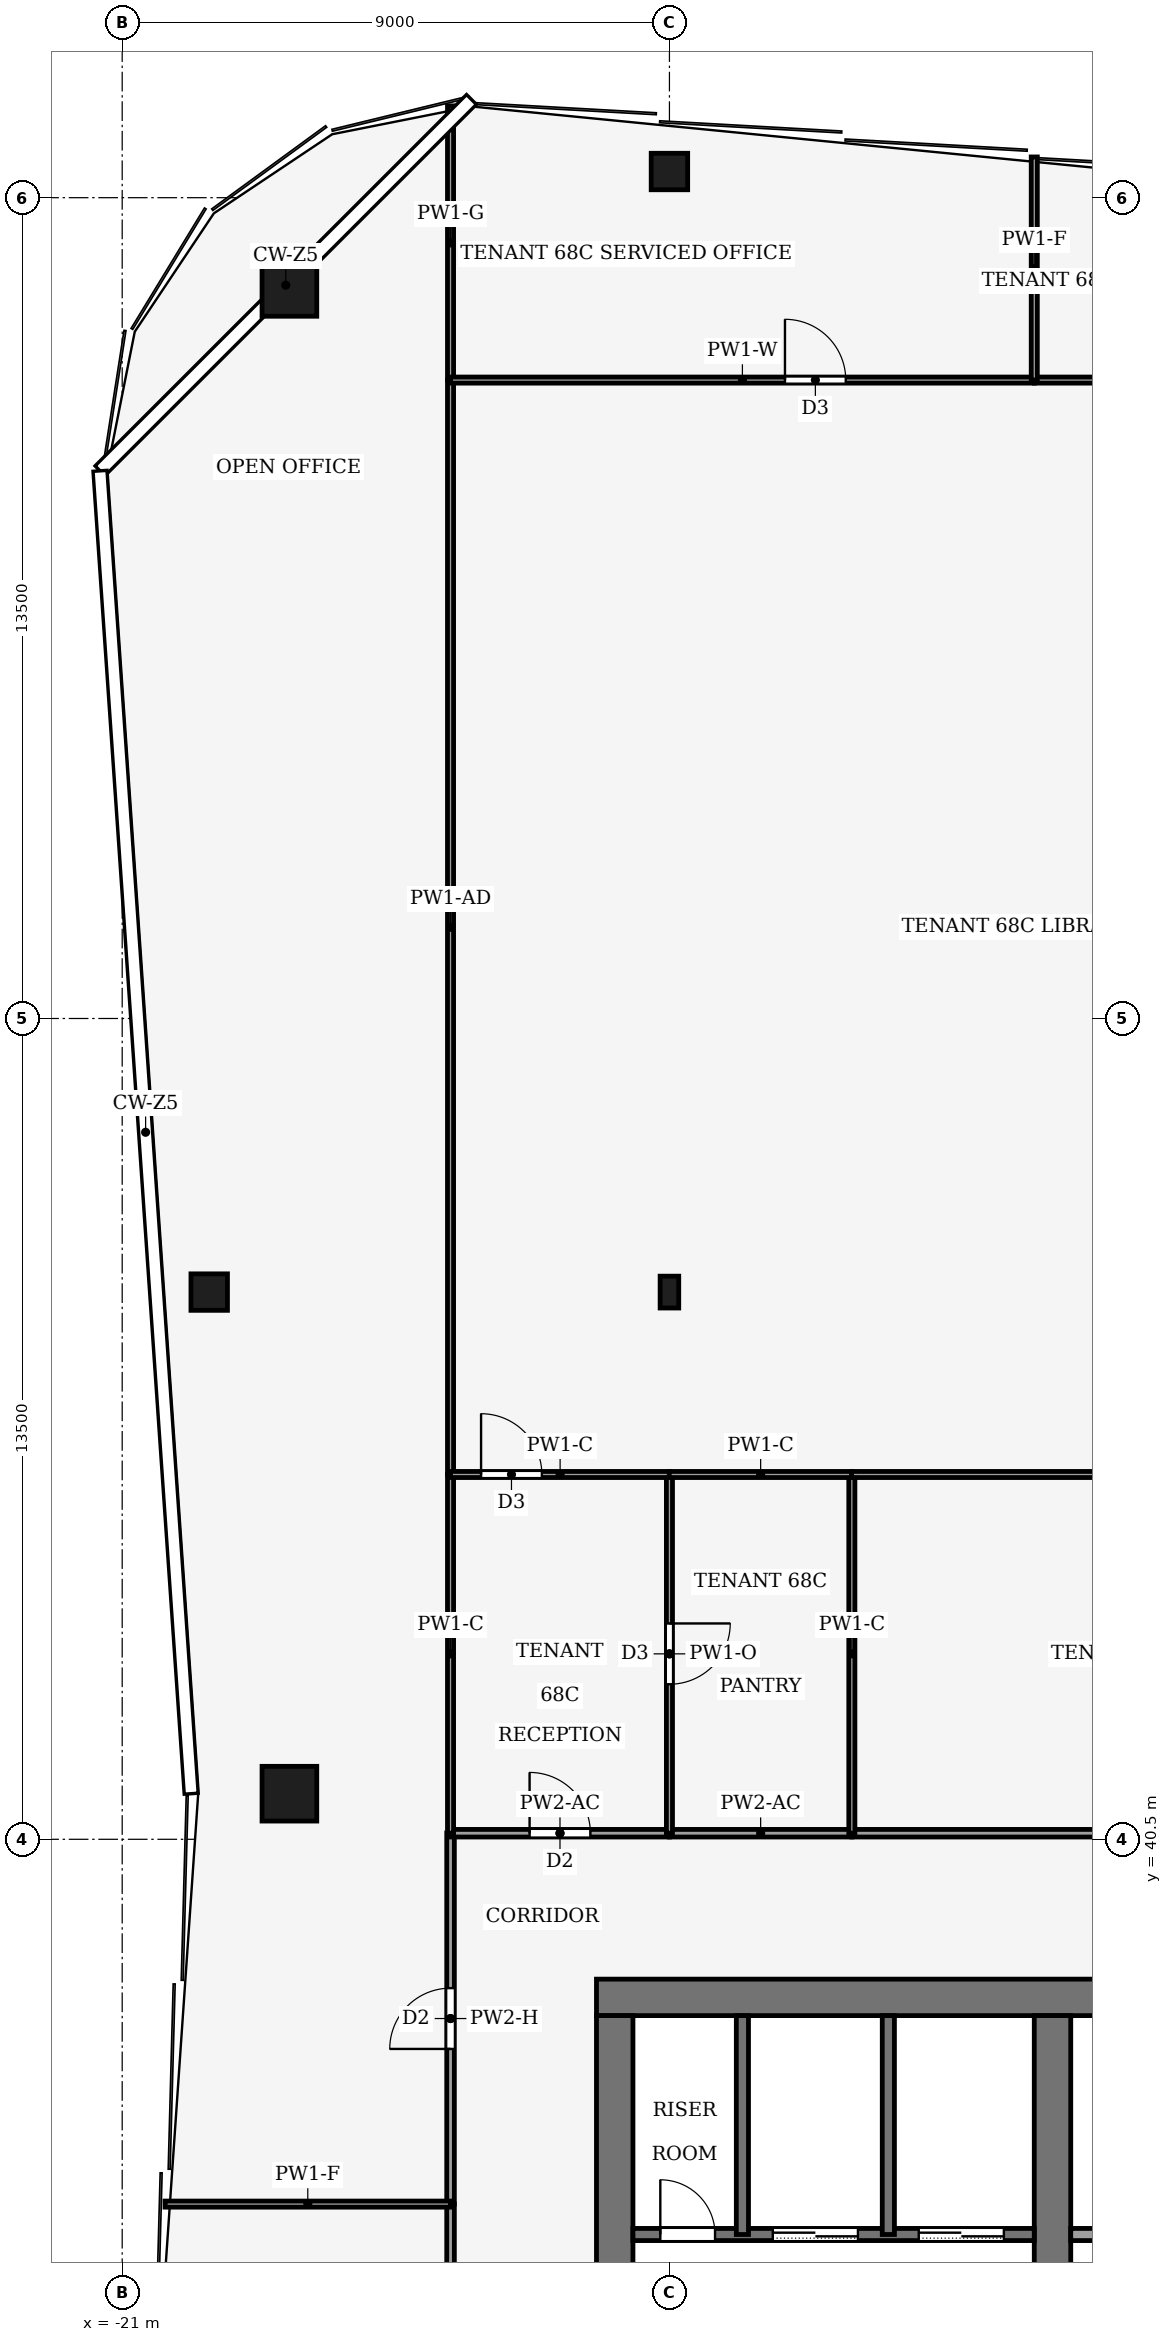
"""IFC4 building model, lengths in metres.
Left out: names, types, materials, properties, quantities, classifications, styles, units other than length and angle.
Written with IfcOpenShell. Run it as: python <this file> out.ifc"""

import sys

from ifc_helpers import new_model, si_unit, direction, frame, frame_2d, origin, origin_2d, place, context, subcontext, project, spatial, rectangle, hollow_rectangle, i_section, extrude, element, fill, save


model = new_model("IFC4")
c1 = context("Model", 3, precision=1e-05, world=origin(), true_north=direction((0.0, 1.0)))
c2 = subcontext(c1, "Body", "Model", "MODEL_VIEW")
j1 = project(units=[si_unit("LENGTHUNIT", "METRE"), si_unit("PLANEANGLEUNIT", "RADIAN")], contexts=[c1])
p1 = place(None, origin())
s1 = spatial("IfcSite", under=j1, at=p1, CompositionType="ELEMENT")
p2 = place(p1, origin())
s2 = spatial("IfcBuilding", under=s1, at=p2, CompositionType="ELEMENT")
p3 = place(p2, frame((0.0, 0.0, 298.0)))
s3 = spatial("IfcBuildingStorey", under=s2, at=p3, CompositionType="ELEMENT", Elevation=298.0)
p4 = place(p3, frame((-13.2, 37.9, -0.13), z_axis=(0.0, 0.0, 1.0), x_axis=(1.0, 0.0, 0.0)))
e1 = element("IfcWall", 1, at=p4, inside=s3, PredefinedType="SHEAR", context=c2, shape_type="SweptSolid", body=[
    extrude(rectangle(XDim=26.4, YDim=0.6, at=frame_2d((13.2, 0.0))), origin(), (0.0, 0.0, 1.0), 4.0),
])
p5 = place(p3, frame((-12.9, 18.4, -0.13), z_axis=(0.0, 0.0, 1.0), x_axis=(0.0, 1.0, 0.0)))
e2 = element("IfcWall", 2, at=p5, inside=s3, PredefinedType="SHEAR", context=c2, shape_type="SweptSolid", body=[
    extrude(rectangle(XDim=19.2, YDim=0.6, at=frame_2d((9.6, 0.0))), origin(), (0.0, 0.0, 1.0), 4.0),
])
p6 = place(p5, frame((2.8, 0.0, 0.13)))
e3 = element("IfcOpeningElement", 3, at=p6, cuts=e2, PredefinedType="OPENING", context=c2, shape_type="SweptSolid", body=[
    extrude(rectangle(XDim=2.4, YDim=2.4, at=frame_2d((1.2, 1.2))), frame((0.0, 0.31, 0.0), z_axis=(0.0, -1.0, 0.0), x_axis=(1.0, 0.0, 0.0)), (0.0, 0.0, 1.0), 0.62),
])
p7 = place(p5, frame((13.4, 0.0, 0.13)))
e4 = element("IfcOpeningElement", 4, at=p7, cuts=e2, PredefinedType="OPENING", context=c2, shape_type="SweptSolid", body=[
    extrude(rectangle(XDim=1.4, YDim=2.2, at=frame_2d((0.7, 1.1))), frame((0.0, 0.31, 0.0), z_axis=(0.0, -1.0, 0.0), x_axis=(1.0, 0.0, 0.0)), (0.0, 0.0, 1.0), 0.62),
])
p8 = place(p3, frame((-5.7, 18.4, -0.13), z_axis=(0.0, 0.0, 1.0), x_axis=(0.0, 1.0, 0.0)))
e5 = element("IfcWall", 5, at=p8, inside=s3, PredefinedType="SHEAR", context=c2, shape_type="SweptSolid", body=[
    extrude(rectangle(XDim=19.2, YDim=0.6, at=frame_2d((9.6, 0.0))), origin(), (0.0, 0.0, 1.0), 4.0),
])
p9 = place(p8, frame((8.35, 0.0, 0.13)))
e6 = element("IfcOpeningElement", 6, at=p9, cuts=e5, PredefinedType="OPENING", context=c2, shape_type="SweptSolid", body=[
    extrude(rectangle(XDim=0.9, YDim=2.1, at=frame_2d((0.45, 1.05))), frame((0.0, 0.31, 0.0), z_axis=(0.0, -1.0, 0.0), x_axis=(1.0, 0.0, 0.0)), (0.0, 0.0, 1.0), 0.62),
])
for number, where, z_axis, x_axis in (
    (7, (-18.25, 66.0, 0.0), (0.0, 0.0, 1.0), (1.0, 0.0, 0.0)),
    (8, (-18.25, 41.25, 0.0), (0.0, 0.0, 1.0), (1.0, 0.0, 0.0)),
):
    element("IfcColumn", number, at=place(p3, frame(where, z_axis=z_axis, x_axis=x_axis)), inside=s3, PredefinedType="COLUMN", context=c2, shape_type="SweptSolid", body=[
        extrude(hollow_rectangle(XDim=0.9, YDim=0.9, WallThickness=0.04, at=origin_2d()), origin(), (0.0, 0.0, 1.0), 4.0),
    ])
for number, where, z_axis, x_axis in (
    (9, (-12.0, 67.93, 0.0), (0.0, 0.0, 1.0), (1.0, 0.0, 0.0)),
    (10, (-19.569, 49.5, 0.0), (0.0, 0.0, 1.0), (1.0, 0.0, 0.0)),
):
    element("IfcColumn", number, at=place(p3, frame(where, z_axis=z_axis, x_axis=x_axis)), inside=s3, PredefinedType="COLUMN", context=c2, shape_type="SweptSolid", body=[
        extrude(hollow_rectangle(XDim=0.6, YDim=0.6, WallThickness=0.025, at=origin_2d()), origin(), (0.0, 0.0, 1.0), 4.0),
    ])
p10 = place(p3, frame((-12.0, 49.5, 0.0), z_axis=(0.0, 0.0, 1.0), x_axis=(1.0, 0.0, 0.0)))
e11 = element("IfcColumn", 11, at=p10, inside=s3, PredefinedType="COLUMN", context=c2, shape_type="SweptSolid", body=[
    extrude(i_section(OverallWidth=0.306, OverallDepth=0.524, WebThickness=0.012, FlangeThickness=0.04, FilletRadius=0.027, at=origin_2d()), origin(), (0.0, 0.0, 1.0), 4.0),
])
p11 = place(p3, frame((-12.6, 34.0, 0.0), z_axis=(0.0, 0.0, 1.0), x_axis=(1.0, 0.0, 0.0)))
e12 = element("IfcWall", 12, at=p11, inside=s3, PredefinedType="PARTITIONING", context=c2, shape_type="SweptSolid", body=[
    extrude(rectangle(XDim=6.6, YDim=0.2, at=frame_2d((3.3, 0.0))), origin(), (0.0, 0.0, 1.0), 3.87),
])
p12 = place(p11, frame((4.7, 0.0, 0.0)))
e13 = element("IfcOpeningElement", 13, at=p12, cuts=e12, PredefinedType="OPENING", context=c2, shape_type="SweptSolid", body=[
    extrude(rectangle(XDim=1.4, YDim=2.2, at=frame_2d((0.7, 1.1))), frame((0.0, 0.11, 0.0), z_axis=(0.0, -1.0, 0.0), x_axis=(1.0, 0.0, 0.0)), (0.0, 0.0, 1.0), 0.22),
])
p13 = place(p11, frame((2.3, 0.0, 0.0)))
e14 = element("IfcOpeningElement", 14, at=p13, cuts=e12, PredefinedType="OPENING", context=c2, shape_type="SweptSolid", body=[
    extrude(rectangle(XDim=1.4, YDim=2.2, at=frame_2d((0.7, 1.1))), frame((0.0, 0.11, 0.0), z_axis=(0.0, -1.0, 0.0), x_axis=(1.0, 0.0, 0.0)), (0.0, 0.0, 1.0), 0.22),
])
p14 = place(p11, frame((0.45, 0.0, 0.0)))
e15 = element("IfcOpeningElement", 15, at=p14, cuts=e12, PredefinedType="OPENING", context=c2, shape_type="SweptSolid", body=[
    extrude(rectangle(XDim=0.9, YDim=2.1, at=frame_2d((0.45, 1.05))), frame((0.0, 0.11, 0.0), z_axis=(0.0, -1.0, 0.0), x_axis=(1.0, 0.0, 0.0)), (0.0, 0.0, 1.0), 0.22),
])
p15 = place(p3, frame((-5.4, 34.0, 0.0), z_axis=(0.0, 0.0, 1.0), x_axis=(1.0, 0.0, 0.0)))
e16 = element("IfcWall", 16, at=p15, inside=s3, PredefinedType="PARTITIONING", context=c2, shape_type="SweptSolid", body=[
    extrude(rectangle(XDim=10.8, YDim=0.2, at=frame_2d((5.4, 0.0))), origin(), (0.0, 0.0, 1.0), 3.87),
])
p16 = place(p15, frame((6.15, 0.0, 0.0)))
e17 = element("IfcOpeningElement", 17, at=p16, cuts=e16, PredefinedType="OPENING", context=c2, shape_type="SweptSolid", body=[
    extrude(rectangle(XDim=1.2, YDim=2.2, at=frame_2d((0.6, 1.1))), frame((0.0, 0.11, 0.0), z_axis=(0.0, -1.0, 0.0), x_axis=(1.0, 0.0, 0.0)), (0.0, 0.0, 1.0), 0.22),
])
p17 = place(p15, frame((8.95, 0.0, 0.0)))
e18 = element("IfcOpeningElement", 18, at=p17, cuts=e16, PredefinedType="OPENING", context=c2, shape_type="SweptSolid", body=[
    extrude(rectangle(XDim=1.0, YDim=2.1, at=frame_2d((0.5, 1.05))), frame((0.0, 0.11, 0.0), z_axis=(0.0, -1.0, 0.0), x_axis=(1.0, 0.0, 0.0)), (0.0, 0.0, 1.0), 0.22),
])
for number, where, z_axis, x_axis in (
    (19, (-10.8, 34.0, 0.0), (0.0, 0.0, 1.0), (0.0, 1.0, 0.0)),
    (20, (-8.4, 34.0, 0.0), (0.0, 0.0, 1.0), (0.0, 1.0, 0.0)),
):
    element("IfcWall", number, at=place(p3, frame(where, z_axis=z_axis, x_axis=x_axis)), inside=s3, PredefinedType="PARTITIONING", context=c2, shape_type="SweptSolid", body=[
        extrude(rectangle(XDim=3.6, YDim=0.2, at=frame_2d((1.8, 0.0))), origin(), (0.0, 0.0, 1.0), 3.87),
    ])
p18 = place(p3, frame((-15.6, 22.5, 0.0), z_axis=(0.0, 0.0, 1.0), x_axis=(0.0, 1.0, 0.0)))
e21 = element("IfcWall", 21, at=p18, inside=s3, PredefinedType="PARTITIONING", context=c2, shape_type="SweptSolid", body=[
    extrude(rectangle(XDim=12.0, YDim=0.125, at=frame_2d((6.0, 0.0))), origin(), (0.0, 0.0, 1.0), 3.54),
])
p19 = place(p18, frame((5.5, 0.0, 0.0)))
e22 = element("IfcOpeningElement", 22, at=p19, cuts=e21, PredefinedType="OPENING", context=c2, shape_type="SweptSolid", body=[
    extrude(rectangle(XDim=1.0, YDim=2.1, at=frame_2d((0.5, 1.05))), frame((0.0, 0.073, 0.0), z_axis=(0.0, -1.0, 0.0), x_axis=(1.0, 0.0, 0.0)), (0.0, 0.0, 1.0), 0.145),
])
p20 = place(p3, frame((-15.6, 34.5, 0.0), z_axis=(0.0, 0.0, 1.0), x_axis=(0.0, 1.0, 0.0)))
e23 = element("IfcWall", 23, at=p20, inside=s3, PredefinedType="PARTITIONING", context=c2, shape_type="SweptSolid", body=[
    extrude(rectangle(XDim=6.104, YDim=0.125, at=frame_2d((3.052, 0.0))), origin(), (0.0, 0.0, 1.0), 3.14),
])
p21 = place(p20, frame((2.552, 0.0, 0.0)))
e24 = element("IfcOpeningElement", 24, at=p21, cuts=e23, PredefinedType="OPENING", context=c2, shape_type="SweptSolid", body=[
    extrude(rectangle(XDim=1.0, YDim=2.1, at=frame_2d((0.5, 1.05))), frame((0.0, 0.073, 0.0), z_axis=(0.0, -1.0, 0.0), x_axis=(1.0, 0.0, 0.0)), (0.0, 0.0, 1.0), 0.145),
])
p22 = place(p3, frame((-15.6, 40.6, 0.0), z_axis=(0.0, 0.0, 1.0), x_axis=(1.0, 0.0, 0.0)))
e25 = element("IfcWall", 25, at=p22, inside=s3, PredefinedType="PARTITIONING", context=c2, shape_type="SweptSolid", body=[
    extrude(rectangle(XDim=3.6, YDim=0.125, at=frame_2d((1.8, 0.0))), origin(), (0.0, 0.0, 1.0), 3.39),
])
p23 = place(p22, frame((1.3, 0.0, 0.0)))
e26 = element("IfcOpeningElement", 26, at=p23, cuts=e25, PredefinedType="OPENING", context=c2, shape_type="SweptSolid", body=[
    extrude(rectangle(XDim=1.0, YDim=2.1, at=frame_2d((0.5, 1.05))), frame((0.0, 0.073, 0.0), z_axis=(0.0, -1.0, 0.0), x_axis=(1.0, 0.0, 0.0)), (0.0, 0.0, 1.0), 0.145),
])
p24 = place(p3, frame((-9.0, 40.6, 0.0), z_axis=(0.0, 0.0, 1.0), x_axis=(-1.0, 0.0, 0.0)))
e27 = element("IfcWall", 27, at=p24, inside=s3, PredefinedType="PARTITIONING", context=c2, shape_type="SweptSolid", body=[
    extrude(rectangle(XDim=3.0, YDim=0.125, at=frame_2d((1.5, 0.0))), origin(), (0.0, 0.0, 1.0), 3.39),
])
p25 = place(p3, frame((-9.0, 40.6, 0.0), z_axis=(0.0, 0.0, 1.0), x_axis=(1.0, 0.0, 0.0)))
e28 = element("IfcWall", 28, at=p25, inside=s3, PredefinedType="PARTITIONING", context=c2, shape_type="SweptSolid", body=[
    extrude(rectangle(XDim=12.0, YDim=0.125, at=frame_2d((6.0, 0.0))), origin(), (0.0, 0.0, 1.0), 3.39),
])
p26 = place(p25, frame((5.5, 0.0, 0.0)))
e29 = element("IfcOpeningElement", 29, at=p26, cuts=e28, PredefinedType="OPENING", context=c2, shape_type="SweptSolid", body=[
    extrude(rectangle(XDim=1.0, YDim=2.1, at=frame_2d((0.5, 1.05))), frame((0.0, 0.073, 0.0), z_axis=(0.0, -1.0, 0.0), x_axis=(1.0, 0.0, 0.0)), (0.0, 0.0, 1.0), 0.145),
])
p27 = place(p3, frame((-15.6, 34.5, 0.0), z_axis=(0.0, 0.0, 1.0), x_axis=(-1.0, 0.0, 0.0)))
e30 = element("IfcWall", 30, at=p27, inside=s3, PredefinedType="PARTITIONING", context=c2, shape_type="SweptSolid", body=[
    extrude(rectangle(XDim=4.695, YDim=0.1, at=frame_2d((2.348, 0.0))), origin(), (0.0, 0.0, 1.0), 3.04),
])
p28 = place(p3, frame((-15.6, 40.6, 0.0), z_axis=(0.0, 0.0, 1.0), x_axis=(0.0, 1.0, 0.0)))
e31 = element("IfcWall", 31, at=p28, inside=s3, PredefinedType="PARTITIONING", context=c2, shape_type="SweptSolid", body=[
    extrude(rectangle(XDim=5.9, YDim=0.1, at=frame_2d((2.95, 0.0))), origin(), (0.0, 0.0, 1.0), 3.87),
])
p29 = place(p3, frame((-15.6, 46.5, 0.0), z_axis=(0.0, 0.0, 1.0), x_axis=(0.0, 1.0, 0.0)))
e32 = element("IfcWall", 32, at=p29, inside=s3, PredefinedType="PARTITIONING", context=c2, shape_type="SweptSolid", body=[
    extrude(rectangle(XDim=18.0, YDim=0.1, at=frame_2d((9.0, 0.0))), origin(), (0.0, 0.0, 1.0), 3.35),
])
p30 = place(p3, frame((-15.6, 64.5, 0.0), z_axis=(0.0, 0.0, 1.0), x_axis=(0.0, 1.0, 0.0)))
e33 = element("IfcWall", 33, at=p30, inside=s3, PredefinedType="PARTITIONING", context=c2, shape_type="SweptSolid", body=[
    extrude(rectangle(XDim=4.51, YDim=0.1, at=frame_2d((2.255, 0.0))), origin(), (0.0, 0.0, 1.0), 2.93),
])
p31 = place(p3, frame((-12.0, 46.5, 0.0), z_axis=(0.0, 0.0, 1.0), x_axis=(0.0, -1.0, 0.0)))
e34 = element("IfcWall", 34, at=p31, inside=s3, PredefinedType="PARTITIONING", context=c2, shape_type="SweptSolid", body=[
    extrude(rectangle(XDim=5.9, YDim=0.1, at=frame_2d((2.95, 0.0))), origin(), (0.0, 0.0, 1.0), 3.39),
])
p32 = place(p31, frame((2.45, 0.0, 0.0)))
e35 = element("IfcOpeningElement", 35, at=p32, cuts=e34, PredefinedType="OPENING", context=c2, shape_type="SweptSolid", body=[
    extrude(rectangle(XDim=1.0, YDim=2.1, at=frame_2d((0.5, 1.05))), frame((0.0, 0.06, 0.0), z_axis=(0.0, -1.0, 0.0), x_axis=(1.0, 0.0, 0.0)), (0.0, 0.0, 1.0), 0.12),
])
p33 = place(p3, frame((-15.6, 46.5, 0.0), z_axis=(0.0, 0.0, 1.0), x_axis=(1.0, 0.0, 0.0)))
e36 = element("IfcWall", 36, at=p33, inside=s3, PredefinedType="PARTITIONING", context=c2, shape_type="SweptSolid", body=[
    extrude(rectangle(XDim=3.604, YDim=0.1, at=frame_2d((1.802, 0.0))), origin(), (0.0, 0.0, 1.0), 3.87),
])
p34 = place(p33, frame((0.502, 0.0, 0.0)))
e37 = element("IfcOpeningElement", 37, at=p34, cuts=e36, PredefinedType="OPENING", context=c2, shape_type="SweptSolid", body=[
    extrude(rectangle(XDim=1.0, YDim=2.1, at=frame_2d((0.5, 1.05))), frame((0.0, 0.06, 0.0), z_axis=(0.0, -1.0, 0.0), x_axis=(1.0, 0.0, 0.0)), (0.0, 0.0, 1.0), 0.12),
])
p35 = place(p3, frame((-9.0, 40.6, 0.0), z_axis=(0.0, 0.0, 1.0), x_axis=(0.0, 1.0, 0.0)))
e38 = element("IfcWall", 38, at=p35, inside=s3, PredefinedType="PARTITIONING", context=c2, shape_type="SweptSolid", body=[
    extrude(rectangle(XDim=5.9, YDim=0.1, at=frame_2d((2.95, 0.0))), origin(), (0.0, 0.0, 1.0), 3.87),
])
p36 = place(p3, frame((-8.996, 46.5, 0.0), z_axis=(0.0, 0.0, 1.0), x_axis=(-1.0, 0.0, 0.0)))
e39 = element("IfcWall", 39, at=p36, inside=s3, PredefinedType="PARTITIONING", context=c2, shape_type="SweptSolid", body=[
    extrude(rectangle(XDim=3.008, YDim=0.1, at=frame_2d((1.504, 0.0))), origin(), (0.0, 0.0, 1.0), 3.87),
])
p37 = place(p3, frame((3.0, 46.5, 0.0), z_axis=(0.0, 0.0, 1.0), x_axis=(-1.0, 0.0, 0.0)))
e40 = element("IfcWall", 40, at=p37, inside=s3, PredefinedType="PARTITIONING", context=c2, shape_type="SweptSolid", body=[
    extrude(rectangle(XDim=12.004, YDim=0.1, at=frame_2d((6.002, 0.0))), origin(), (0.0, 0.0, 1.0), 3.39),
])
p38 = place(p3, frame((-15.6, 64.5, 0.0), z_axis=(0.0, 0.0, 1.0), x_axis=(1.0, 0.0, 0.0)))
e41 = element("IfcWall", 41, at=p38, inside=s3, PredefinedType="PARTITIONING", context=c2, shape_type="SweptSolid", body=[
    extrude(rectangle(XDim=9.6, YDim=0.1, at=frame_2d((4.8, 0.0))), origin(), (0.0, 0.0, 1.0), 3.24),
])
p39 = place(p38, frame((5.5, 0.0, 0.0)))
e42 = element("IfcOpeningElement", 42, at=p39, cuts=e41, PredefinedType="OPENING", context=c2, shape_type="SweptSolid", body=[
    extrude(rectangle(XDim=1.0, YDim=2.1, at=frame_2d((0.5, 1.05))), frame((0.0, 0.06, 0.0), z_axis=(0.0, -1.0, 0.0), x_axis=(1.0, 0.0, 0.0)), (0.0, 0.0, 1.0), 0.12),
])
p40 = place(p3, frame((-6.0, 64.5, 0.0), z_axis=(0.0, 0.0, 1.0), x_axis=(1.0, 0.0, 0.0)))
e43 = element("IfcWall", 43, at=p40, inside=s3, PredefinedType="PARTITIONING", context=c2, shape_type="SweptSolid", body=[
    extrude(rectangle(XDim=9.0, YDim=0.1, at=frame_2d((4.5, 0.0))), origin(), (0.0, 0.0, 1.0), 3.24),
])
p41 = place(p40, frame((1.6, 0.0, 0.0)))
e44 = element("IfcOpeningElement", 44, at=p41, cuts=e43, PredefinedType="OPENING", context=c2, shape_type="SweptSolid", body=[
    extrude(rectangle(XDim=1.0, YDim=2.1, at=frame_2d((0.5, 1.05))), frame((0.0, 0.06, 0.0), z_axis=(0.0, -1.0, 0.0), x_axis=(1.0, 0.0, 0.0)), (0.0, 0.0, 1.0), 0.12),
])
p42 = place(p3, frame((-6.0, 64.5, 0.0), z_axis=(0.0, 0.0, 1.0), x_axis=(0.0, 1.0, 0.0)))
e45 = element("IfcWall", 45, at=p42, inside=s3, PredefinedType="PARTITIONING", context=c2, shape_type="SweptSolid", body=[
    extrude(rectangle(XDim=3.67, YDim=0.1, at=frame_2d((1.835, 0.0))), origin(), (0.0, 0.0, 1.0), 3.04),
])
p43 = place(p12, origin())
e46 = element("IfcDoor", 46, at=p43, inside=s3, OperationType="SLIDING_TO_LEFT", PredefinedType="DOOR", context=c2, shape_type="SweptSolid", body=[
    extrude(rectangle(XDim=1.4, YDim=2.2, at=frame_2d((0.7, 1.1))), frame((0.0, 0.025, 0.0), z_axis=(0.0, -1.0, 0.0), x_axis=(1.0, 0.0, 0.0)), (0.0, 0.0, 1.0), 0.05),
])
fill(e13, e46)
p44 = place(p13, origin())
e47 = element("IfcDoor", 47, at=p44, inside=s3, OperationType="SLIDING_TO_LEFT", PredefinedType="DOOR", context=c2, shape_type="SweptSolid", body=[
    extrude(rectangle(XDim=1.4, YDim=2.2, at=frame_2d((0.7, 1.1))), frame((0.0, 0.025, 0.0), z_axis=(0.0, -1.0, 0.0), x_axis=(1.0, 0.0, 0.0)), (0.0, 0.0, 1.0), 0.05),
])
fill(e14, e47)
p45 = place(p14, origin())
e48 = element("IfcDoor", 48, at=p45, inside=s3, OperationType="SINGLE_SWING_RIGHT", PredefinedType="DOOR", context=c2, shape_type="SweptSolid", body=[
    extrude(rectangle(XDim=0.9, YDim=2.1, at=frame_2d((0.45, 1.05))), frame((0.0, 0.025, 0.0), z_axis=(0.0, -1.0, 0.0), x_axis=(1.0, 0.0, 0.0)), (0.0, 0.0, 1.0), 0.05),
])
fill(e15, e48)
p46 = place(p21, origin())
e49 = element("IfcDoor", 49, at=p46, inside=s3, OperationType="SINGLE_SWING_LEFT", PredefinedType="DOOR", context=c2, shape_type="SweptSolid", body=[
    extrude(rectangle(XDim=1.0, YDim=2.1, at=frame_2d((0.5, 1.05))), frame((0.0, 0.025, 0.0), z_axis=(0.0, -1.0, 0.0), x_axis=(1.0, 0.0, 0.0)), (0.0, 0.0, 1.0), 0.05),
])
fill(e24, e49)
p47 = place(p23, origin())
e50 = element("IfcDoor", 50, at=p47, inside=s3, OperationType="SINGLE_SWING_LEFT", PredefinedType="DOOR", context=c2, shape_type="SweptSolid", body=[
    extrude(rectangle(XDim=1.0, YDim=2.1, at=frame_2d((0.5, 1.05))), frame((0.0, 0.025, 0.0), z_axis=(0.0, -1.0, 0.0), x_axis=(1.0, 0.0, 0.0)), (0.0, 0.0, 1.0), 0.05),
])
fill(e26, e50)
p48 = place(p32, origin())
e51 = element("IfcDoor", 51, at=p48, inside=s3, OperationType="SINGLE_SWING_LEFT", PredefinedType="DOOR", context=c2, shape_type="SweptSolid", body=[
    extrude(rectangle(XDim=1.0, YDim=2.1, at=frame_2d((0.5, 1.05))), frame((0.0, 0.025, 0.0), z_axis=(0.0, -1.0, 0.0), x_axis=(1.0, 0.0, 0.0)), (0.0, 0.0, 1.0), 0.05),
])
fill(e35, e51)
p49 = place(p34, origin())
e52 = element("IfcDoor", 52, at=p49, inside=s3, OperationType="SINGLE_SWING_LEFT", PredefinedType="DOOR", context=c2, shape_type="SweptSolid", body=[
    extrude(rectangle(XDim=1.0, YDim=2.1, at=frame_2d((0.5, 1.05))), frame((0.0, 0.025, 0.0), z_axis=(0.0, -1.0, 0.0), x_axis=(1.0, 0.0, 0.0)), (0.0, 0.0, 1.0), 0.05),
])
fill(e37, e52)
p50 = place(p39, origin())
e53 = element("IfcDoor", 53, at=p50, inside=s3, OperationType="SINGLE_SWING_RIGHT", PredefinedType="DOOR", context=c2, shape_type="SweptSolid", body=[
    extrude(rectangle(XDim=1.0, YDim=2.1, at=frame_2d((0.5, 1.05))), frame((0.0, 0.025, 0.0), z_axis=(0.0, -1.0, 0.0), x_axis=(1.0, 0.0, 0.0)), (0.0, 0.0, 1.0), 0.05),
])
fill(e42, e53)
save(model, sys.argv[1])
